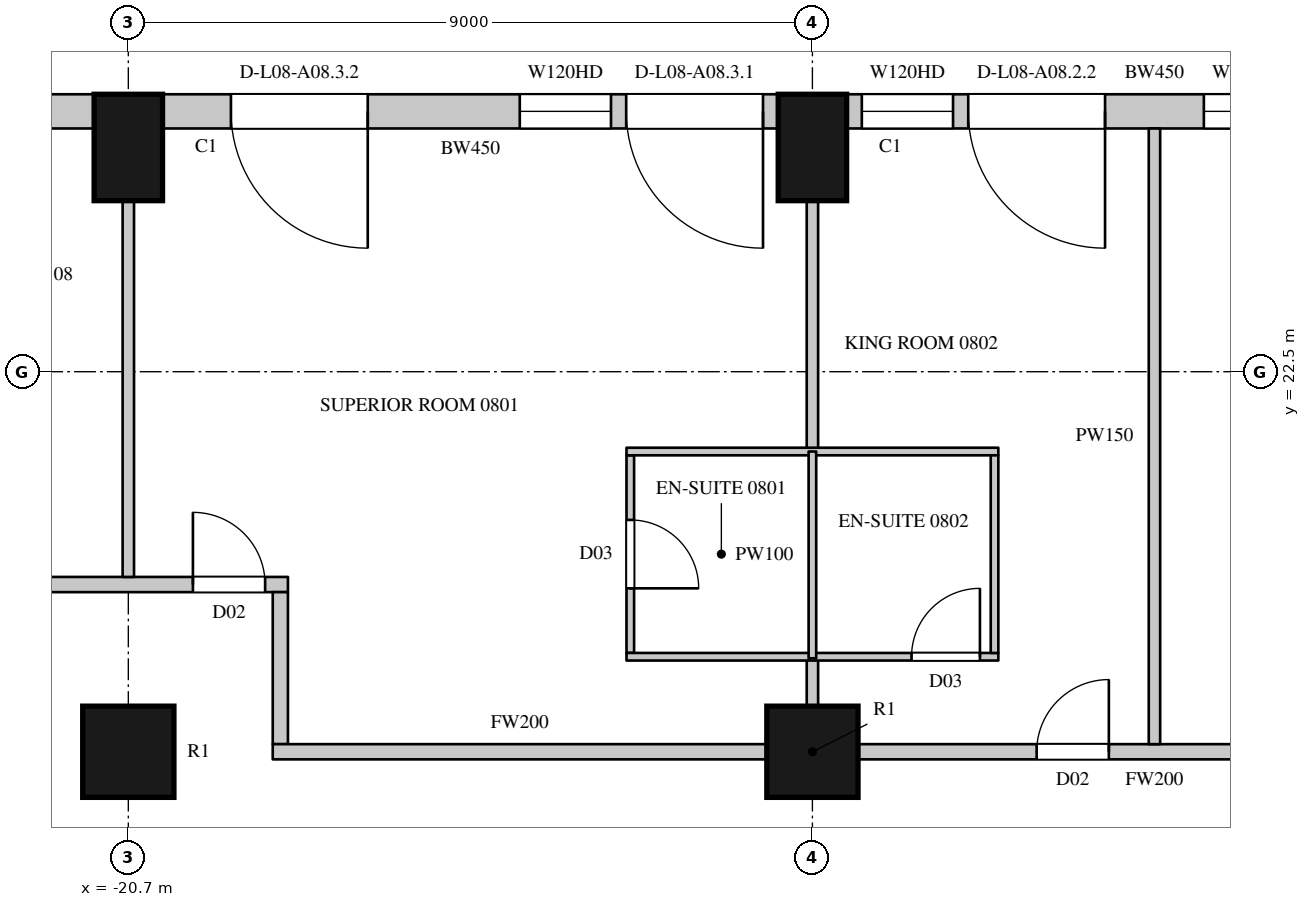
"""IFC4 building model, lengths in metres.
Left out: names, types, materials, properties, quantities, classifications, styles, units other than length and angle.
Written with IfcOpenShell. Run it as: python <this file> out.ifc"""

import sys

from ifc_helpers import new_model, si_unit, direction, frame, frame_2d, origin, origin_2d, place, context, subcontext, project, spatial, rectangle, circle, extrude, element, fill, save


model = new_model("IFC4")
c1 = context("Model", 3, precision=1e-05, world=origin(), true_north=direction((0.0, 1.0)))
c2 = subcontext(c1, "Body", "Model", "MODEL_VIEW")
j1 = project(units=[si_unit("LENGTHUNIT", "METRE"), si_unit("PLANEANGLEUNIT", "RADIAN")], contexts=[c1])
p1 = place(None, origin())
s1 = spatial("IfcSite", under=j1, at=p1, CompositionType="ELEMENT")
p2 = place(p1, origin())
s2 = spatial("IfcBuilding", under=s1, at=p2, CompositionType="ELEMENT")
p3 = place(p2, frame((0.0, 0.0, 59.1)))
s3 = spatial("IfcBuildingStorey", under=s2, at=p3, CompositionType="ELEMENT", Elevation=59.1)
for number, where, z_axis, x_axis in (
    (1, (-11.7, 25.45, 0.0), (0.0, 0.0, 1.0), (-1.0, 0.0, 0.0)),
    (2, (-20.7, 25.45, 0.0), (0.0, 0.0, 1.0), (-1.0, 0.0, 0.0)),
):
    element("IfcColumn", number, at=place(p3, frame(where, z_axis=z_axis, x_axis=x_axis)), inside=s3, PredefinedType="COLUMN", context=c2, shape_type="SweptSolid", body=[
        extrude(rectangle(XDim=0.9, YDim=1.4, at=origin_2d()), origin(), (0.0, 0.0, 1.0), 3.6),
    ])
for number, where, z_axis, x_axis in (
    (3, (-20.7, 17.5, 0.0), (0.0, 0.0, 1.0), (1.0, 0.0, 0.0)),
    (4, (-11.7, 17.5, 0.0), (0.0, 0.0, 1.0), (1.0, 0.0, 0.0)),
):
    element("IfcColumn", number, at=place(p3, frame(where, z_axis=z_axis, x_axis=x_axis)), inside=s3, PredefinedType="COLUMN", context=c2, shape_type="SweptSolid", body=[
        extrude(circle(Radius=0.6, at=origin_2d()), origin(), (0.0, 0.0, 1.0), 3.6),
    ])
p4 = place(p3, frame((-3.15, 25.925, 0.0), z_axis=(0.0, 0.0, 1.0), x_axis=(-1.0, 0.0, 0.0)))
e5 = element("IfcWall", 5, at=p4, inside=s3, PredefinedType="SOLIDWALL", context=c2, shape_type="SweptSolid", body=[
    extrude(rectangle(XDim=8.1, YDim=0.45, at=frame_2d((4.05, 0.0))), origin(), (0.0, 0.0, 1.0), 3.3),
])
p5 = place(p4, frame((0.2, 0.0, 0.0)))
e6 = element("IfcOpeningElement", 6, at=p5, cuts=e5, PredefinedType="OPENING", context=c2, shape_type="SweptSolid", body=[
    extrude(rectangle(XDim=1.8, YDim=2.4, at=frame_2d((0.9, 1.2))), frame((0.0, 0.235, 0.0), z_axis=(0.0, -1.0, 0.0), x_axis=(1.0, 0.0, 0.0)), (0.0, 0.0, 1.0), 0.47),
])
p6 = place(p4, frame((2.2, 0.0, 1.05)))
e7 = element("IfcOpeningElement", 7, at=p6, cuts=e5, PredefinedType="OPENING", context=c2, shape_type="SweptSolid", body=[
    extrude(rectangle(XDim=1.2, YDim=2.0, at=frame_2d((0.6, 1.0))), frame((0.0, 0.235, 0.0), z_axis=(0.0, -1.0, 0.0), x_axis=(1.0, 0.0, 0.0)), (0.0, 0.0, 1.0), 0.47),
])
p7 = place(p4, frame((4.7, 0.0, 0.0)))
e8 = element("IfcOpeningElement", 8, at=p7, cuts=e5, PredefinedType="OPENING", context=c2, shape_type="SweptSolid", body=[
    extrude(rectangle(XDim=1.8, YDim=2.4, at=frame_2d((0.9, 1.2))), frame((0.0, 0.235, 0.0), z_axis=(0.0, -1.0, 0.0), x_axis=(1.0, 0.0, 0.0)), (0.0, 0.0, 1.0), 0.47),
])
p8 = place(p4, frame((6.7, 0.0, 1.05)))
e9 = element("IfcOpeningElement", 9, at=p8, cuts=e5, PredefinedType="OPENING", context=c2, shape_type="SweptSolid", body=[
    extrude(rectangle(XDim=1.2, YDim=2.0, at=frame_2d((0.6, 1.0))), frame((0.0, 0.235, 0.0), z_axis=(0.0, -1.0, 0.0), x_axis=(1.0, 0.0, 0.0)), (0.0, 0.0, 1.0), 0.47),
])
p9 = place(p3, frame((-12.15, 25.925, 0.0), z_axis=(0.0, 0.0, 1.0), x_axis=(-1.0, 0.0, 0.0)))
e10 = element("IfcWall", 10, at=p9, inside=s3, PredefinedType="SOLIDWALL", context=c2, shape_type="SweptSolid", body=[
    extrude(rectangle(XDim=8.1, YDim=0.45, at=frame_2d((4.05, 0.0))), origin(), (0.0, 0.0, 1.0), 3.3),
])
p10 = place(p9, frame((0.2, 0.0, 0.0)))
e11 = element("IfcOpeningElement", 11, at=p10, cuts=e10, PredefinedType="OPENING", context=c2, shape_type="SweptSolid", body=[
    extrude(rectangle(XDim=1.8, YDim=2.4, at=frame_2d((0.9, 1.2))), frame((0.0, 0.235, 0.0), z_axis=(0.0, -1.0, 0.0), x_axis=(1.0, 0.0, 0.0)), (0.0, 0.0, 1.0), 0.47),
])
p11 = place(p9, frame((2.2, 0.0, 1.05)))
e12 = element("IfcOpeningElement", 12, at=p11, cuts=e10, PredefinedType="OPENING", context=c2, shape_type="SweptSolid", body=[
    extrude(rectangle(XDim=1.2, YDim=2.0, at=frame_2d((0.6, 1.0))), frame((0.0, 0.235, 0.0), z_axis=(0.0, -1.0, 0.0), x_axis=(1.0, 0.0, 0.0)), (0.0, 0.0, 1.0), 0.47),
])
p12 = place(p9, frame((5.4, 0.0, 0.0)))
e13 = element("IfcOpeningElement", 13, at=p12, cuts=e10, PredefinedType="OPENING", context=c2, shape_type="SweptSolid", body=[
    extrude(rectangle(XDim=1.8, YDim=2.4, at=frame_2d((0.9, 1.2))), frame((0.0, 0.235, 0.0), z_axis=(0.0, -1.0, 0.0), x_axis=(1.0, 0.0, 0.0)), (0.0, 0.0, 1.0), 0.47),
])
p13 = place(p3, frame((-21.15, 25.925, 0.0), z_axis=(0.0, 0.0, 1.0), x_axis=(-1.0, 0.0, 0.0)))
e14 = element("IfcWall", 14, at=p13, inside=s3, PredefinedType="SOLIDWALL", context=c2, shape_type="SweptSolid", body=[
    extrude(rectangle(XDim=2.914, YDim=0.45, at=frame_2d((1.457, 0.0))), origin(), (0.0, 0.0, 1.0), 3.3),
])
p14 = place(p3, frame((-23.7, 19.7, 0.0), z_axis=(0.0, 0.0, 1.0), x_axis=(1.0, 0.0, 0.0)))
e15 = element("IfcWall", 15, at=p14, inside=s3, PredefinedType="PARTITIONING", context=c2, shape_type="SweptSolid", body=[
    extrude(rectangle(XDim=5.1, YDim=0.2, at=frame_2d((2.55, 0.0))), origin(), (0.0, 0.0, 1.0), 3.3),
])
p15 = place(p14, frame((0.8, 0.0, 0.0)))
e16 = element("IfcOpeningElement", 16, at=p15, cuts=e15, PredefinedType="OPENING", context=c2, shape_type="SweptSolid", body=[
    extrude(rectangle(XDim=0.9, YDim=2.2, at=frame_2d((0.45, 1.1))), frame((0.0, 0.11, 0.0), z_axis=(0.0, -1.0, 0.0), x_axis=(1.0, 0.0, 0.0)), (0.0, 0.0, 1.0), 0.22),
])
p16 = place(p14, frame((3.85, 0.0, 0.0)))
e17 = element("IfcOpeningElement", 17, at=p16, cuts=e15, PredefinedType="OPENING", context=c2, shape_type="SweptSolid", body=[
    extrude(rectangle(XDim=0.95, YDim=2.2, at=frame_2d((0.475, 1.1))), frame((0.0, 0.11, 0.0), z_axis=(0.0, -1.0, 0.0), x_axis=(1.0, 0.0, 0.0)), (0.0, 0.0, 1.0), 0.22),
])
p17 = place(p3, frame((-18.7, 17.6, 0.0), z_axis=(0.0, 0.0, 1.0), x_axis=(0.0, 1.0, 0.0)))
e18 = element("IfcWall", 18, at=p17, inside=s3, PredefinedType="PARTITIONING", context=c2, shape_type="SweptSolid", body=[
    extrude(rectangle(XDim=2.0, YDim=0.2, at=frame_2d((1.0, 0.0))), origin(), (0.0, 0.0, 1.0), 3.3),
])
p18 = place(p3, frame((-18.8, 17.5, 0.0), z_axis=(0.0, 0.0, 1.0), x_axis=(1.0, 0.0, 0.0)))
e19 = element("IfcWall", 19, at=p18, inside=s3, PredefinedType="PARTITIONING", context=c2, shape_type="SweptSolid", body=[
    extrude(rectangle(XDim=6.5, YDim=0.2, at=frame_2d((3.25, 0.0))), origin(), (0.0, 0.0, 1.0), 2.75),
])
p19 = place(p3, frame((-11.1, 17.5, 0.0), z_axis=(0.0, 0.0, 1.0), x_axis=(1.0, 0.0, 0.0)))
e20 = element("IfcWall", 20, at=p19, inside=s3, PredefinedType="PARTITIONING", context=c2, shape_type="SweptSolid", body=[
    extrude(rectangle(XDim=7.8, YDim=0.2, at=frame_2d((3.9, 0.0))), origin(), (0.0, 0.0, 1.0), 2.75),
])
p20 = place(p19, frame((2.35, 0.0, 0.0)))
e21 = element("IfcOpeningElement", 21, at=p20, cuts=e20, PredefinedType="OPENING", context=c2, shape_type="SweptSolid", body=[
    extrude(rectangle(XDim=0.95, YDim=2.2, at=frame_2d((0.475, 1.1))), frame((0.0, 0.11, 0.0), z_axis=(0.0, -1.0, 0.0), x_axis=(1.0, 0.0, 0.0)), (0.0, 0.0, 1.0), 0.22),
])
p21 = place(p19, frame((5.2, 0.0, 0.0)))
e22 = element("IfcOpeningElement", 22, at=p21, cuts=e20, PredefinedType="OPENING", context=c2, shape_type="SweptSolid", body=[
    extrude(rectangle(XDim=0.95, YDim=2.2, at=frame_2d((0.475, 1.1))), frame((0.0, 0.11, 0.0), z_axis=(0.0, -1.0, 0.0), x_axis=(1.0, 0.0, 0.0)), (0.0, 0.0, 1.0), 0.22),
])
p22 = place(p3, frame((-20.7, 19.8, 0.0), z_axis=(0.0, 0.0, 1.0), x_axis=(0.0, 1.0, 0.0)))
e23 = element("IfcWall", 23, at=p22, inside=s3, PredefinedType="PARTITIONING", context=c2, shape_type="SweptSolid", body=[
    extrude(rectangle(XDim=4.95, YDim=0.15, at=frame_2d((2.475, 0.0))), origin(), (0.0, 0.0, 1.0), 2.75),
])
p23 = place(p3, frame((-11.7, 18.1, 0.0), z_axis=(0.0, 0.0, 1.0), x_axis=(0.0, 1.0, 0.0)))
e24 = element("IfcWall", 24, at=p23, inside=s3, PredefinedType="PARTITIONING", context=c2, shape_type="SweptSolid", body=[
    extrude(rectangle(XDim=0.63, YDim=0.15, at=frame_2d((0.315, 0.0))), origin(), (0.0, 0.0, 1.0), 2.75),
])
p24 = place(p3, frame((-11.7, 21.45, 0.0), z_axis=(0.0, 0.0, 1.0), x_axis=(0.0, 1.0, 0.0)))
e25 = element("IfcWall", 25, at=p24, inside=s3, PredefinedType="PARTITIONING", context=c2, shape_type="SweptSolid", body=[
    extrude(rectangle(XDim=3.3, YDim=0.15, at=frame_2d((1.65, 0.0))), origin(), (0.0, 0.0, 1.0), 2.75),
])
p25 = place(p3, frame((-7.2, 17.6, 0.0), z_axis=(0.0, 0.0, 1.0), x_axis=(0.0, 1.0, 0.0)))
e26 = element("IfcWall", 26, at=p25, inside=s3, PredefinedType="PARTITIONING", context=c2, shape_type="SweptSolid", body=[
    extrude(rectangle(XDim=8.1, YDim=0.15, at=frame_2d((4.05, 0.0))), origin(), (0.0, 0.0, 1.0), 2.65),
])
p26 = place(p3, frame((-14.096, 18.8, 0.0), z_axis=(0.0, 0.0, 1.0), x_axis=(0.0, 1.0, 0.0)))
e27 = element("IfcWall", 27, at=p26, inside=s3, PredefinedType="PARTITIONING", context=c2, shape_type="SweptSolid", body=[
    extrude(rectangle(XDim=2.6, YDim=0.1, at=frame_2d((1.3, 0.0))), origin(), (0.0, 0.0, 1.0), 3.3),
])
p27 = place(p26, frame((0.85, 0.0, 0.0)))
e28 = element("IfcOpeningElement", 28, at=p27, cuts=e27, PredefinedType="OPENING", context=c2, shape_type="SweptSolid", body=[
    extrude(rectangle(XDim=0.9, YDim=2.2, at=frame_2d((0.45, 1.1))), frame((0.0, 0.06, 0.0), z_axis=(0.0, -1.0, 0.0), x_axis=(1.0, 0.0, 0.0)), (0.0, 0.0, 1.0), 0.12),
])
p28 = place(p3, frame((-14.146, 18.75, 0.0), z_axis=(0.0, 0.0, 1.0), x_axis=(1.0, 0.0, 0.0)))
e29 = element("IfcWall", 29, at=p28, inside=s3, PredefinedType="PARTITIONING", context=c2, shape_type="SweptSolid", body=[
    extrude(rectangle(XDim=4.892, YDim=0.1, at=frame_2d((2.446, 0.0))), origin(), (0.0, 0.0, 1.0), 3.3),
])
p29 = place(p28, frame((3.75, 0.0, 0.0)))
e30 = element("IfcOpeningElement", 30, at=p29, cuts=e29, PredefinedType="OPENING", context=c2, shape_type="SweptSolid", body=[
    extrude(rectangle(XDim=0.9, YDim=2.2, at=frame_2d((0.45, 1.1))), frame((0.0, 0.06, 0.0), z_axis=(0.0, -1.0, 0.0), x_axis=(1.0, 0.0, 0.0)), (0.0, 0.0, 1.0), 0.12),
])
p30 = place(p3, frame((-14.146, 21.45, 0.0), z_axis=(0.0, 0.0, 1.0), x_axis=(1.0, 0.0, 0.0)))
e31 = element("IfcWall", 31, at=p30, inside=s3, PredefinedType="PARTITIONING", context=c2, shape_type="SweptSolid", body=[
    extrude(rectangle(XDim=4.892, YDim=0.1, at=frame_2d((2.446, 0.0))), origin(), (0.0, 0.0, 1.0), 3.3),
])
p31 = place(p3, frame((-11.7, 18.73, 0.0), z_axis=(0.0, 0.0, 1.0), x_axis=(0.0, 1.0, 0.0)))
e32 = element("IfcWall", 32, at=p31, inside=s3, PredefinedType="PARTITIONING", context=c2, shape_type="SweptSolid", body=[
    extrude(rectangle(XDim=2.72, YDim=0.1, at=frame_2d((1.36, 0.0))), origin(), (0.0, 0.0, 1.0), 2.75),
])
p32 = place(p3, frame((-9.304, 18.8, 0.0), z_axis=(0.0, 0.0, 1.0), x_axis=(0.0, 1.0, 0.0)))
e33 = element("IfcWall", 33, at=p32, inside=s3, PredefinedType="PARTITIONING", context=c2, shape_type="SweptSolid", body=[
    extrude(rectangle(XDim=2.6, YDim=0.1, at=frame_2d((1.3, 0.0))), origin(), (0.0, 0.0, 1.0), 3.3),
])
p33 = place(p6, origin())
e34 = element("IfcWindow", 34, at=p33, inside=s3, PartitioningType="SINGLE_PANEL", PredefinedType="WINDOW", context=c2, shape_type="SweptSolid", body=[
    extrude(rectangle(XDim=1.2, YDim=2.0, at=frame_2d((0.6, 1.0))), frame((0.0, 0.135, 0.0), z_axis=(0.0, -1.0, 0.0), x_axis=(1.0, 0.0, 0.0)), (0.0, 0.0, 1.0), 0.06),
])
fill(e7, e34)
p34 = place(p7, origin())
e35 = element("IfcDoor", 35, at=p34, inside=s3, OperationType="SLIDING_TO_LEFT", PredefinedType="DOOR", context=c2, shape_type="SweptSolid", body=[
    extrude(rectangle(XDim=1.8, YDim=2.4, at=frame_2d((0.9, 1.2))), frame((0.0, 0.13, 0.0), z_axis=(0.0, -1.0, 0.0), x_axis=(1.0, 0.0, 0.0)), (0.0, 0.0, 1.0), 0.05),
])
fill(e8, e35)
p35 = place(p8, origin())
e36 = element("IfcWindow", 36, at=p35, inside=s3, PartitioningType="SINGLE_PANEL", PredefinedType="WINDOW", context=c2, shape_type="SweptSolid", body=[
    extrude(rectangle(XDim=1.2, YDim=2.0, at=frame_2d((0.6, 1.0))), frame((0.0, 0.135, 0.0), z_axis=(0.0, -1.0, 0.0), x_axis=(1.0, 0.0, 0.0)), (0.0, 0.0, 1.0), 0.06),
])
fill(e9, e36)
p36 = place(p10, origin())
e37 = element("IfcDoor", 37, at=p36, inside=s3, OperationType="SLIDING_TO_LEFT", PredefinedType="DOOR", context=c2, shape_type="SweptSolid", body=[
    extrude(rectangle(XDim=1.8, YDim=2.4, at=frame_2d((0.9, 1.2))), frame((0.0, 0.13, 0.0), z_axis=(0.0, -1.0, 0.0), x_axis=(1.0, 0.0, 0.0)), (0.0, 0.0, 1.0), 0.05),
])
fill(e11, e37)
p37 = place(p11, origin())
e38 = element("IfcWindow", 38, at=p37, inside=s3, PartitioningType="SINGLE_PANEL", PredefinedType="WINDOW", context=c2, shape_type="SweptSolid", body=[
    extrude(rectangle(XDim=1.2, YDim=2.0, at=frame_2d((0.6, 1.0))), frame((0.0, 0.135, 0.0), z_axis=(0.0, -1.0, 0.0), x_axis=(1.0, 0.0, 0.0)), (0.0, 0.0, 1.0), 0.06),
])
fill(e12, e38)
p38 = place(p12, origin())
e39 = element("IfcDoor", 39, at=p38, inside=s3, OperationType="SLIDING_TO_LEFT", PredefinedType="DOOR", context=c2, shape_type="SweptSolid", body=[
    extrude(rectangle(XDim=1.8, YDim=2.4, at=frame_2d((0.9, 1.2))), frame((0.0, 0.13, 0.0), z_axis=(0.0, -1.0, 0.0), x_axis=(1.0, 0.0, 0.0)), (0.0, 0.0, 1.0), 0.05),
])
fill(e13, e39)
p39 = place(p16, origin())
e40 = element("IfcDoor", 40, at=p39, inside=s3, OperationType="SINGLE_SWING_LEFT", PredefinedType="DOOR", context=c2, shape_type="SweptSolid", body=[
    extrude(rectangle(XDim=0.95, YDim=2.2, at=frame_2d((0.475, 1.1))), frame((0.0, 0.025, 0.0), z_axis=(0.0, -1.0, 0.0), x_axis=(1.0, 0.0, 0.0)), (0.0, 0.0, 1.0), 0.05),
])
fill(e17, e40)
p40 = place(p27, origin())
e41 = element("IfcDoor", 41, at=p40, inside=s3, OperationType="SINGLE_SWING_RIGHT", PredefinedType="DOOR", context=c2, shape_type="SweptSolid", body=[
    extrude(rectangle(XDim=0.9, YDim=2.2, at=frame_2d((0.45, 1.1))), frame((0.0, 0.025, 0.0), z_axis=(0.0, -1.0, 0.0), x_axis=(1.0, 0.0, 0.0)), (0.0, 0.0, 1.0), 0.05),
])
fill(e28, e41)
p41 = place(p20, origin())
e42 = element("IfcDoor", 42, at=p41, inside=s3, OperationType="SINGLE_SWING_RIGHT", PredefinedType="DOOR", context=c2, shape_type="SweptSolid", body=[
    extrude(rectangle(XDim=0.95, YDim=2.2, at=frame_2d((0.475, 1.1))), frame((0.0, 0.025, 0.0), z_axis=(0.0, -1.0, 0.0), x_axis=(1.0, 0.0, 0.0)), (0.0, 0.0, 1.0), 0.05),
])
fill(e21, e42)
p42 = place(p29, origin())
e43 = element("IfcDoor", 43, at=p42, inside=s3, OperationType="SINGLE_SWING_RIGHT", PredefinedType="DOOR", context=c2, shape_type="SweptSolid", body=[
    extrude(rectangle(XDim=0.9, YDim=2.2, at=frame_2d((0.45, 1.1))), frame((0.0, 0.025, 0.0), z_axis=(0.0, -1.0, 0.0), x_axis=(1.0, 0.0, 0.0)), (0.0, 0.0, 1.0), 0.05),
])
fill(e30, e43)
save(model, sys.argv[1])
